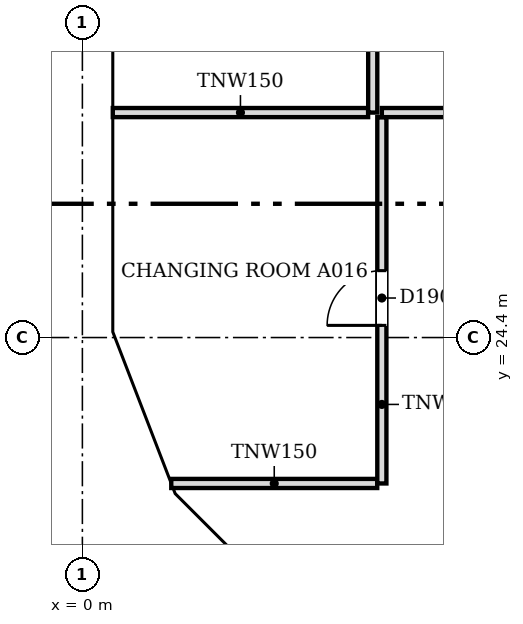
"""IFC4 building model, lengths in metres.
Left out: names, types, materials, properties, quantities, classifications, styles, units other than length and angle.
Written with IfcOpenShell. Run it as: python <this file> out.ifc"""

import sys

from ifc_helpers import new_model, si_unit, direction, frame, frame_2d, origin, place, context, subcontext, project, spatial, polyline, rectangle, outline, extrude, faceted_brep, source, transform, mapped, element, fill, save


model = new_model("IFC4")
c1 = context("Model", 3, precision=1e-05, world=origin(), true_north=direction((0.0, 1.0)))
c2 = subcontext(c1, "Body", "Model", "MODEL_VIEW")
j1 = project(units=[si_unit("LENGTHUNIT", "METRE"), si_unit("PLANEANGLEUNIT", "RADIAN")], contexts=[c1])
p1 = place(None, origin())
s1 = spatial("IfcSite", under=j1, at=p1, CompositionType="ELEMENT")
p2 = place(p1, origin())
s2 = spatial("IfcBuilding", under=s1, at=p2, CompositionType="ELEMENT")
p3 = place(p2, frame((0.0, 0.0, 236.9)))
s3 = spatial("IfcBuildingStorey", under=s2, at=p3, CompositionType="ELEMENT", Elevation=236.9)
m1 = source(origin(), c2, "Body", "Brep", [
    faceted_brep([(6.053, -0.25, 0.0), (3.05, -0.25, 3.8), (0.0, -0.25, 0.0), (0.0, 0.25, 0.0), (3.05, 0.25, 3.8), (6.007, 0.25, 0.059), (6.007, 0.25, 0.0), (6.053, 0.0, 0.0)], [[[0, 1, 2]], [[3, 4, 5, 6]], [[5, 4, 1, 0, 7]], [[4, 3, 2, 1]], [[3, 6, 7, 0, 2]], [[7, 6, 5]]]),
])
p4 = place(p3, frame((0.25, 30.5, 0.0), z_axis=(0.0, 0.0, 1.0), x_axis=(0.0, -1.0, 0.0)))
e1 = element("IfcWall", 1, at=p4, inside=s3, PredefinedType="SOLIDWALL", context=c2, shape_type="MappedRepresentation", body=[
    mapped(m1, transform((0.0, 0.0, 0.0), scale=1.0)),
])
m2 = source(origin(), c2, "Body", "SweptSolid", [
    extrude(outline(polyline([(5.537, 0.25), (3.049, 3.399), (0.521, 0.25), (5.537, 0.25)])), frame((0.0, 0.26, 0.0), z_axis=(0.0, -1.0, 0.0), x_axis=(1.0, 0.0, 0.0)), (0.0, 0.0, 1.0), 0.52),
])
p5 = place(p4, origin())
e2 = element("IfcOpeningElement", 2, at=p5, cuts=e1, PredefinedType="OPENING", context=c2, shape_type="MappedRepresentation", body=[
    mapped(m2, transform((0.0, 0.0, 0.0), scale=1.0)),
])
m3 = source(origin(), c2, "Body", "Brep", [
    faceted_brep([(3.003, -0.25, 3.732), (2.95, -0.25, 3.8), (0.0, -0.25, 0.0), (3.003, -0.25, 0.0), (0.047, 0.25, 0.06), (2.898, 0.25, 3.732), (2.898, 0.25, 0.0), (0.047, 0.25, 0.0), (2.95, 0.0, 3.8), (0.0, 0.0, 0.0)], [[[0, 1, 2, 3]], [[4, 5, 6, 7]], [[8, 1, 0]], [[5, 4, 9, 2, 1, 8]], [[7, 6, 3, 2, 9]], [[7, 9, 4]], [[3, 6, 5, 8, 0]]]),
])
p6 = place(p3, frame((0.25, 24.447, 0.0), z_axis=(0.0, 0.0, 1.0), x_axis=(0.35992665181, -0.932980602862, 0.0)))
e3 = element("IfcWall", 3, at=p6, inside=s3, PredefinedType="SOLIDWALL", context=c2, shape_type="MappedRepresentation", body=[
    mapped(m3, transform((0.0, 0.0, 0.0), scale=1.0)),
])
m4 = source(origin(), c2, "Body", "SweptSolid", [
    extrude(outline(polyline([(2.75, 3.135), (0.511, 0.25), (2.75, 0.25), (2.75, 3.135)])), frame((0.0, 0.26, 0.0), z_axis=(0.0, -1.0, 0.0), x_axis=(1.0, 0.0, 0.0)), (0.0, 0.0, 1.0), 0.52),
])
p7 = place(p6, origin())
e4 = element("IfcOpeningElement", 4, at=p7, cuts=e3, PredefinedType="OPENING", context=c2, shape_type="MappedRepresentation", body=[
    mapped(m4, transform((0.0, 0.0, 0.0), scale=1.0)),
])
m5 = source(origin(), c2, "Body", "Brep", [
    faceted_brep([(2.997, -0.25, 0.0), (0.053, -0.25, 3.8), (0.0, -0.25, 3.732), (0.0, -0.25, 0.0), (0.106, 0.25, 3.732), (2.944, 0.25, 0.068), (2.944, 0.25, 0.0), (0.106, 0.25, 0.0), (0.053, 0.0, 3.8), (2.997, 0.0, 0.0)], [[[0, 1, 2, 3]], [[4, 5, 6, 7]], [[5, 4, 8, 1, 0, 9]], [[2, 1, 8]], [[7, 6, 9, 0, 3]], [[7, 3, 2, 8, 4]], [[9, 6, 5]]]),
])
p8 = place(p3, frame((1.274, 21.731, 0.0), z_axis=(0.0, 0.0, 1.0), x_axis=(0.707147509625, -0.707066050402, 0.0)))
e5 = element("IfcWall", 5, at=p8, inside=s3, PredefinedType="SOLIDWALL", context=c2, shape_type="MappedRepresentation", body=[
    mapped(m5, transform((0.0, 0.0, 0.0), scale=1.0)),
])
m6 = source(origin(), c2, "Body", "SweptSolid", [
    extrude(outline(polyline([(2.487, 0.25), (0.253, 3.134), (0.253, 0.25), (2.487, 0.25)])), frame((0.0, 0.26, 0.0), z_axis=(0.0, -1.0, 0.0), x_axis=(1.0, 0.0, 0.0)), (0.0, 0.0, 1.0), 0.52),
])
p9 = place(p8, origin())
e6 = element("IfcOpeningElement", 6, at=p9, cuts=e5, PredefinedType="OPENING", context=c2, shape_type="MappedRepresentation", body=[
    mapped(m6, transform((0.0, 0.0, 0.0), scale=1.0)),
])
p10 = place(p2, frame((0.0, 0.0, 240.7)))
s4 = spatial("IfcBuildingStorey", under=s2, at=p10, CompositionType="ELEMENT", Elevation=240.7)
m7 = source(origin(), c2, "Body", "SweptSolid", [
    extrude(outline(polyline([(3.05, 0.0), (6.1, 3.8), (3.05, 7.6), (0.0, 3.8), (3.05, 0.0)])), frame((0.0, 0.25, 0.0), z_axis=(0.0, -1.0, 0.0), x_axis=(1.0, 0.0, 0.0)), (0.0, 0.0, 1.0), 0.5),
])
p11 = place(p10, frame((0.25, 33.55, -3.8), z_axis=(0.0, 0.0, 1.0), x_axis=(0.0, -1.0, 0.0)))
e7 = element("IfcWall", 7, at=p11, inside=s4, PredefinedType="SOLIDWALL", context=c2, shape_type="MappedRepresentation", body=[
    mapped(m7, transform((0.0, 0.0, 0.0), scale=1.0)),
])
m8 = source(origin(), c2, "Body", "SweptSolid", [
    extrude(outline(polyline([(3.05, 0.399), (5.78, 3.8), (3.05, 7.201), (0.321, 3.8), (3.05, 0.399)])), frame((0.0, 0.26, 0.0), z_axis=(0.0, -1.0, 0.0), x_axis=(1.0, 0.0, 0.0)), (0.0, 0.0, 1.0), 0.52),
])
p12 = place(p11, origin())
e8 = element("IfcOpeningElement", 8, at=p12, cuts=e7, PredefinedType="OPENING", context=c2, shape_type="MappedRepresentation", body=[
    mapped(m8, transform((0.0, 0.0, 0.0), scale=1.0)),
])
m9 = source(origin(), c2, "Body", "Brep", [
    faceted_brep([(3.003, -0.25, 0.0), (3.05, -0.25, 0.06), (3.05, -0.25, 7.54), (3.003, -0.25, 7.6), (0.0, -0.25, 3.8), (0.0, 0.25, 3.8), (2.957, 0.25, 7.541), (2.957, 0.25, 0.059), (3.003, 0.0, 0.0), (3.003, 0.0, 7.6)], [[[0, 1, 2, 3, 4]], [[5, 6, 7]], [[1, 0, 8]], [[9, 3, 2]], [[6, 5, 4, 3, 9]], [[5, 7, 8, 0, 4]], [[1, 8, 7, 6, 9, 2]]]),
])
p13 = place(p10, frame((0.25, 27.45, -3.8), z_axis=(0.0, 0.0, 1.0), x_axis=(0.0, -1.0, 0.0)))
e9 = element("IfcWall", 9, at=p13, inside=s4, PredefinedType="SOLIDWALL", context=c2, shape_type="MappedRepresentation", body=[
    mapped(m9, transform((0.0, 0.0, 0.0), scale=1.0)),
])
m10 = source(origin(), c2, "Body", "SweptSolid", [
    extrude(outline(polyline([(2.803, 6.944), (0.319, 3.8), (2.803, 0.656), (2.803, 6.944)])), frame((0.0, 0.26, 0.0), z_axis=(0.0, -1.0, 0.0), x_axis=(1.0, 0.0, 0.0)), (0.0, 0.0, 1.0), 0.52),
])
p14 = place(p13, origin())
e10 = element("IfcOpeningElement", 10, at=p14, cuts=e9, PredefinedType="OPENING", context=c2, shape_type="MappedRepresentation", body=[
    mapped(m10, transform((0.0, 0.0, 0.0), scale=1.0)),
])
m11 = source(origin(), c2, "Body", "Brep", [
    faceted_brep([(0.047, -0.25, 0.0), (2.997, -0.25, 3.8), (0.047, -0.25, 7.6), (0.0, -0.25, 7.541), (0.0, -0.25, 0.059), (0.093, 0.25, 7.54), (2.944, 0.25, 3.868), (2.944, 0.25, 3.732), (0.093, 0.25, 0.06), (2.997, 0.0, 3.8), (0.047, 0.0, 0.0), (0.047, 0.0, 7.6)], [[[0, 1, 2, 3, 4]], [[5, 6, 7, 8]], [[8, 7, 9, 1, 0, 10]], [[6, 5, 11, 2, 1, 9]], [[3, 2, 11]], [[10, 0, 4]], [[8, 10, 4, 3, 11, 5]], [[9, 7, 6]]]),
])
p15 = place(p10, frame((0.233, 24.49, -3.8), z_axis=(0.0, 0.0, 1.0), x_axis=(0.359901446078, -0.932990326376, 0.0)))
e11 = element("IfcWall", 11, at=p15, inside=s4, PredefinedType="SOLIDWALL", context=c2, shape_type="MappedRepresentation", body=[
    mapped(m11, transform((0.0, 0.0, 0.0), scale=1.0)),
])
m12 = source(origin(), c2, "Body", "SweptSolid", [
    extrude(outline(polyline([(0.247, 0.665), (2.681, 3.8), (0.247, 6.935), (0.247, 0.665)])), frame((0.0, 0.26, 0.0), z_axis=(0.0, -1.0, 0.0), x_axis=(1.0, 0.0, 0.0)), (0.0, 0.0, 1.0), 0.52),
])
p16 = place(p15, origin())
e12 = element("IfcOpeningElement", 12, at=p16, cuts=e11, PredefinedType="OPENING", context=c2, shape_type="MappedRepresentation", body=[
    mapped(m12, transform((0.0, 0.0, 0.0), scale=1.0)),
])
m13 = source(origin(), c2, "Body", "Brep", [
    faceted_brep([(2.944, -0.25, 0.0), (2.997, -0.25, 0.068), (2.997, -0.25, 7.532), (2.944, -0.25, 7.6), (0.0, -0.25, 3.8), (0.053, 0.25, 3.868), (2.891, 0.25, 7.532), (2.891, 0.25, 0.068), (0.053, 0.25, 3.732), (2.944, 0.0, 0.0), (2.944, 0.0, 7.6), (0.0, 0.0, 3.8)], [[[0, 1, 2, 3, 4]], [[5, 6, 7, 8]], [[1, 0, 9]], [[10, 3, 2]], [[6, 5, 11, 4, 3, 10]], [[8, 7, 9, 0, 4, 11]], [[8, 11, 5]], [[1, 9, 7, 6, 10, 2]]]),
])
p17 = place(p10, frame((1.312, 21.694, -3.8), z_axis=(0.0, 0.0, 1.0), x_axis=(0.707066050402, -0.707147509625, 0.0)))
e13 = element("IfcWall", 13, at=p17, inside=s4, PredefinedType="SOLIDWALL", context=c2, shape_type="MappedRepresentation", body=[
    mapped(m13, transform((0.0, 0.0, 0.0), scale=1.0)),
])
m14 = source(origin(), c2, "Body", "SweptSolid", [
    extrude(outline(polyline([(2.744, 6.934), (0.316, 3.8), (2.744, 0.667), (2.744, 6.934)])), frame((0.0, 0.26, 0.0), z_axis=(0.0, -1.0, 0.0), x_axis=(1.0, 0.0, 0.0)), (0.0, 0.0, 1.0), 0.52),
])
p18 = place(p17, origin())
e14 = element("IfcOpeningElement", 14, at=p18, cuts=e13, PredefinedType="OPENING", context=c2, shape_type="MappedRepresentation", body=[
    mapped(m14, transform((0.0, 0.0, 0.0), scale=1.0)),
])
p19 = place(p3, frame((1.462, 22.0, 0.0), z_axis=(0.0, 0.0, 1.0), x_axis=(1.0, 0.0, 0.0)))
e15 = element("IfcWall", 15, at=p19, inside=s3, PredefinedType="PARTITIONING", context=c2, shape_type="SweptSolid", body=[
    extrude(rectangle(XDim=3.387, YDim=0.15, at=frame_2d((1.694, 0.0))), origin(), (0.0, 0.0, 1.0), 3.067),
])
p20 = place(p3, frame((4.925, 22.0, 0.0), z_axis=(0.0, 0.0, 1.0), x_axis=(0.0, 1.0, 0.0)))
e16 = element("IfcWall", 16, at=p20, inside=s3, PredefinedType="PARTITIONING", context=c2, shape_type="SweptSolid", body=[
    extrude(rectangle(XDim=6.024, YDim=0.15, at=frame_2d((3.012, 0.0))), origin(), (0.0, 0.0, 1.0), 3.067),
])
m15 = source(origin(), c2, "Body", "SweptSolid", [
    extrude(rectangle(XDim=0.9, YDim=2.1, at=frame_2d((0.45, 1.05))), frame((0.0, 0.085, 0.0), z_axis=(0.0, -1.0, 0.0), x_axis=(1.0, 0.0, 0.0)), (0.0, 0.0, 1.0), 0.17),
])
p21 = place(p20, frame((2.6, 0.0, 0.0)))
e17 = element("IfcOpeningElement", 17, at=p21, cuts=e16, PredefinedType="OPENING", context=c2, shape_type="MappedRepresentation", body=[
    mapped(m15, transform((0.0, 0.0, 0.0), scale=1.0)),
])
p22 = place(p3, frame((0.5, 28.1, 0.0), z_axis=(0.0, 0.0, 1.0), x_axis=(1.0, 0.0, 0.0)))
e18 = element("IfcWall", 18, at=p22, inside=s3, PredefinedType="PARTITIONING", context=c2, shape_type="SweptSolid", body=[
    extrude(rectangle(XDim=4.199, YDim=0.15, at=frame_2d((2.1, 0.0))), origin(), (0.0, 0.0, 1.0), 3.067),
])
p23 = place(p3, frame((4.775, 28.1, 0.0), z_axis=(0.0, 0.0, 1.0), x_axis=(0.0, 1.0, 0.0)))
e19 = element("IfcWall", 19, at=p23, inside=s3, PredefinedType="PARTITIONING", context=c2, shape_type="SweptSolid", body=[
    extrude(rectangle(XDim=9.074, YDim=0.15, at=frame_2d((4.537, 0.0))), origin(), (0.0, 0.0, 1.0), 3.067),
])
p24 = place(p23, frame((1.8, 0.0, 0.0)))
e20 = element("IfcOpeningElement", 20, at=p24, cuts=e19, PredefinedType="OPENING", context=c2, shape_type="MappedRepresentation", body=[
    mapped(m15, transform((0.0, 0.0, 0.0), scale=1.0)),
])
p25 = place(p23, frame((6.32, 0.0, 0.0)))
e21 = element("IfcOpeningElement", 21, at=p25, cuts=e19, PredefinedType="OPENING", context=c2, shape_type="MappedRepresentation", body=[
    mapped(m15, transform((0.0, 0.0, 0.0), scale=1.0)),
])
p26 = place(p3, frame((4.925, 28.1, 0.0), z_axis=(0.0, 0.0, 1.0), x_axis=(1.0, 0.0, 0.0)))
e22 = element("IfcWall", 22, at=p26, inside=s3, PredefinedType="PARTITIONING", context=c2, shape_type="SweptSolid", body=[
    extrude(rectangle(XDim=23.099, YDim=0.15, at=frame_2d((11.549, 0.0))), origin(), (0.0, 0.0, 1.0), 3.067),
])
m16 = source(origin(), c2, "Body", "SweptSolid", [
    extrude(rectangle(XDim=0.9, YDim=2.1, at=frame_2d((0.45, 1.05))), frame((0.0, 0.025, 0.0), z_axis=(0.0, -1.0, 0.0), x_axis=(1.0, 0.0, 0.0)), (0.0, 0.0, 1.0), 0.05),
])
p27 = place(p21, origin())
e23 = element("IfcDoor", 23, at=p27, inside=s3, OperationType="SINGLE_SWING_LEFT", PredefinedType="DOOR", context=c2, shape_type="MappedRepresentation", body=[
    mapped(m16, transform((0.0, 0.0, 0.0), scale=1.0)),
])
fill(e17, e23)
save(model, sys.argv[1])
